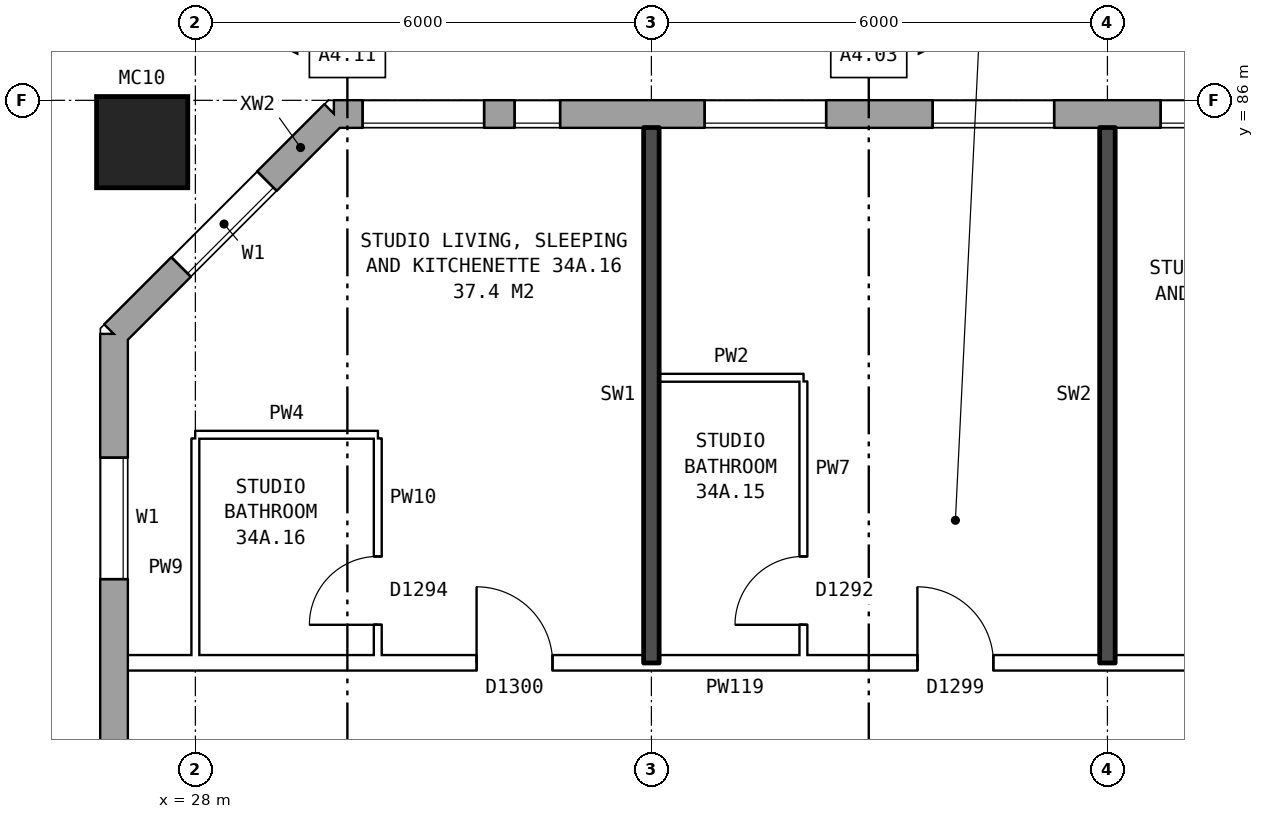
"""IFC4 building model, lengths in metres.
Left out: names, types, materials, properties, quantities, classifications, styles, units other than length and angle.
Written with IfcOpenShell. Run it as: python <this file> out.ifc"""

import sys

from ifc_helpers import new_model, si_unit, direction, frame, frame_2d, origin, origin_2d, place, context, subcontext, project, spatial, rectangle, hollow_rectangle, extrude, element, fill, save


model = new_model("IFC4")
c1 = context("Model", 3, precision=1e-05, world=origin(), true_north=direction((0.0, 1.0)))
c2 = subcontext(c1, "Body", "Model", "MODEL_VIEW")
j1 = project(units=[si_unit("LENGTHUNIT", "METRE"), si_unit("PLANEANGLEUNIT", "RADIAN")], contexts=[c1])
p1 = place(None, origin())
s1 = spatial("IfcSite", under=j1, at=p1, CompositionType="ELEMENT")
p2 = place(p1, origin())
s2 = spatial("IfcBuilding", under=s1, at=p2, CompositionType="ELEMENT")
p3 = place(p2, frame((0.0, 0.0, 123.7)))
s3 = spatial("IfcBuildingStorey", under=s2, at=p3, CompositionType="ELEMENT", Elevation=123.7)
p4 = place(p3, frame((27.3, 85.45, 0.0), z_axis=(0.0, 0.0, 1.0), x_axis=(1.0, 0.0, 0.0)))
e1 = element("IfcColumn", 1, at=p4, inside=s3, PredefinedType="COLUMN", context=c2, shape_type="SweptSolid", body=[
    extrude(hollow_rectangle(XDim=1.2, YDim=1.2, WallThickness=0.065, at=origin_2d()), origin(), (0.0, 0.0, 1.0), 3.1),
])
p5 = place(p3, frame((72.925, 85.82, 0.0), z_axis=(0.0, 0.0, 1.0), x_axis=(-1.0, 0.0, 0.0)))
e2 = element("IfcWall", 2, at=p5, inside=s3, PredefinedType="STANDARD", context=c2, shape_type="SweptSolid", body=[
    extrude(rectangle(XDim=43.101, YDim=0.36, at=frame_2d((21.55, 0.0))), origin(), (0.0, 0.0, 1.0), 2.85),
])
p6 = place(p5, frame((0.625, 0.0, 0.8)))
e3 = element("IfcOpeningElement", 3, at=p6, cuts=e2, PredefinedType="OPENING", context=c2, shape_type="SweptSolid", body=[
    extrude(rectangle(XDim=1.6, YDim=1.8, at=frame_2d((0.8, 0.9))), frame((0.0, 0.19, 0.0), z_axis=(0.0, -1.0, 0.0), x_axis=(1.0, 0.0, 0.0)), (0.0, 0.0, 1.0), 0.38),
])
p7 = place(p5, frame((4.125, 0.0, 0.8)))
e4 = element("IfcOpeningElement", 4, at=p7, cuts=e2, PredefinedType="OPENING", context=c2, shape_type="SweptSolid", body=[
    extrude(rectangle(XDim=0.6, YDim=0.9, at=frame_2d((0.3, 0.45))), frame((0.0, 0.19, 0.0), z_axis=(0.0, -1.0, 0.0), x_axis=(1.0, 0.0, 0.0)), (0.0, 0.0, 1.0), 0.38),
])
p8 = place(p5, frame((6.625, 0.0, 0.8)))
e5 = element("IfcOpeningElement", 5, at=p8, cuts=e2, PredefinedType="OPENING", context=c2, shape_type="SweptSolid", body=[
    extrude(rectangle(XDim=1.6, YDim=1.8, at=frame_2d((0.8, 0.9))), frame((0.0, 0.19, 0.0), z_axis=(0.0, -1.0, 0.0), x_axis=(1.0, 0.0, 0.0)), (0.0, 0.0, 1.0), 0.38),
])
p9 = place(p5, frame((9.625, 0.0, 0.8)))
e6 = element("IfcOpeningElement", 6, at=p9, cuts=e2, PredefinedType="OPENING", context=c2, shape_type="SweptSolid", body=[
    extrude(rectangle(XDim=1.6, YDim=1.8, at=frame_2d((0.8, 0.9))), frame((0.0, 0.19, 0.0), z_axis=(0.0, -1.0, 0.0), x_axis=(1.0, 0.0, 0.0)), (0.0, 0.0, 1.0), 0.38),
])
p10 = place(p5, frame((12.625, 0.0, 0.8)))
e7 = element("IfcOpeningElement", 7, at=p10, cuts=e2, PredefinedType="OPENING", context=c2, shape_type="SweptSolid", body=[
    extrude(rectangle(XDim=1.6, YDim=1.8, at=frame_2d((0.8, 0.9))), frame((0.0, 0.19, 0.0), z_axis=(0.0, -1.0, 0.0), x_axis=(1.0, 0.0, 0.0)), (0.0, 0.0, 1.0), 0.38),
])
p11 = place(p5, frame((15.625, 0.0, 0.8)))
e8 = element("IfcOpeningElement", 8, at=p11, cuts=e2, PredefinedType="OPENING", context=c2, shape_type="SweptSolid", body=[
    extrude(rectangle(XDim=1.6, YDim=1.8, at=frame_2d((0.8, 0.9))), frame((0.0, 0.19, 0.0), z_axis=(0.0, -1.0, 0.0), x_axis=(1.0, 0.0, 0.0)), (0.0, 0.0, 1.0), 0.38),
])
p12 = place(p5, frame((18.625, 0.0, 0.8)))
e9 = element("IfcOpeningElement", 9, at=p12, cuts=e2, PredefinedType="OPENING", context=c2, shape_type="SweptSolid", body=[
    extrude(rectangle(XDim=1.6, YDim=1.8, at=frame_2d((0.8, 0.9))), frame((0.0, 0.19, 0.0), z_axis=(0.0, -1.0, 0.0), x_axis=(1.0, 0.0, 0.0)), (0.0, 0.0, 1.0), 0.38),
])
p13 = place(p5, frame((21.625, 0.0, 0.8)))
e10 = element("IfcOpeningElement", 10, at=p13, cuts=e2, PredefinedType="OPENING", context=c2, shape_type="SweptSolid", body=[
    extrude(rectangle(XDim=1.6, YDim=1.8, at=frame_2d((0.8, 0.9))), frame((0.0, 0.19, 0.0), z_axis=(0.0, -1.0, 0.0), x_axis=(1.0, 0.0, 0.0)), (0.0, 0.0, 1.0), 0.38),
])
p14 = place(p5, frame((24.625, 0.0, 0.8)))
e11 = element("IfcOpeningElement", 11, at=p14, cuts=e2, PredefinedType="OPENING", context=c2, shape_type="SweptSolid", body=[
    extrude(rectangle(XDim=1.6, YDim=1.8, at=frame_2d((0.8, 0.9))), frame((0.0, 0.19, 0.0), z_axis=(0.0, -1.0, 0.0), x_axis=(1.0, 0.0, 0.0)), (0.0, 0.0, 1.0), 0.38),
])
p15 = place(p5, frame((27.625, 0.0, 0.8)))
e12 = element("IfcOpeningElement", 12, at=p15, cuts=e2, PredefinedType="OPENING", context=c2, shape_type="SweptSolid", body=[
    extrude(rectangle(XDim=1.6, YDim=1.8, at=frame_2d((0.8, 0.9))), frame((0.0, 0.19, 0.0), z_axis=(0.0, -1.0, 0.0), x_axis=(1.0, 0.0, 0.0)), (0.0, 0.0, 1.0), 0.38),
])
p16 = place(p5, frame((30.625, 0.0, 0.8)))
e13 = element("IfcOpeningElement", 13, at=p16, cuts=e2, PredefinedType="OPENING", context=c2, shape_type="SweptSolid", body=[
    extrude(rectangle(XDim=1.6, YDim=1.8, at=frame_2d((0.8, 0.9))), frame((0.0, 0.19, 0.0), z_axis=(0.0, -1.0, 0.0), x_axis=(1.0, 0.0, 0.0)), (0.0, 0.0, 1.0), 0.38),
])
p17 = place(p5, frame((33.625, 0.0, 0.8)))
e14 = element("IfcOpeningElement", 14, at=p17, cuts=e2, PredefinedType="OPENING", context=c2, shape_type="SweptSolid", body=[
    extrude(rectangle(XDim=1.6, YDim=1.8, at=frame_2d((0.8, 0.9))), frame((0.0, 0.19, 0.0), z_axis=(0.0, -1.0, 0.0), x_axis=(1.0, 0.0, 0.0)), (0.0, 0.0, 1.0), 0.38),
])
p18 = place(p5, frame((36.625, 0.0, 0.8)))
e15 = element("IfcOpeningElement", 15, at=p18, cuts=e2, PredefinedType="OPENING", context=c2, shape_type="SweptSolid", body=[
    extrude(rectangle(XDim=1.6, YDim=1.8, at=frame_2d((0.8, 0.9))), frame((0.0, 0.19, 0.0), z_axis=(0.0, -1.0, 0.0), x_axis=(1.0, 0.0, 0.0)), (0.0, 0.0, 1.0), 0.38),
])
p19 = place(p5, frame((40.125, 0.0, 1.7)))
e16 = element("IfcOpeningElement", 16, at=p19, cuts=e2, PredefinedType="OPENING", context=c2, shape_type="SweptSolid", body=[
    extrude(rectangle(XDim=0.6, YDim=0.9, at=frame_2d((0.3, 0.45))), frame((0.0, 0.19, 0.0), z_axis=(0.0, -1.0, 0.0), x_axis=(1.0, 0.0, 0.0)), (0.0, 0.0, 1.0), 0.38),
])
p20 = place(p5, frame((5.125, 0.0, 0.8)))
e17 = element("IfcOpeningElement", 17, at=p20, cuts=e2, PredefinedType="OPENING", context=c2, shape_type="SweptSolid", body=[
    extrude(rectangle(XDim=1.2, YDim=1.8, at=frame_2d((0.6, 0.9))), frame((0.0, 0.19, 0.0), z_axis=(0.0, -1.0, 0.0), x_axis=(1.0, 0.0, 0.0)), (0.0, 0.0, 1.0), 0.38),
])
p21 = place(p5, frame((41.125, 0.0, 0.8)))
e18 = element("IfcOpeningElement", 18, at=p21, cuts=e2, PredefinedType="OPENING", context=c2, shape_type="SweptSolid", body=[
    extrude(rectangle(XDim=1.6, YDim=1.8, at=frame_2d((0.8, 0.9))), frame((0.0, 0.19, 0.0), z_axis=(0.0, -1.0, 0.0), x_axis=(1.0, 0.0, 0.0)), (0.0, 0.0, 1.0), 0.38),
])
p22 = place(p3, frame((29.825, 85.82, 0.0), z_axis=(0.0, 0.0, 1.0), x_axis=(-0.707106781187, -0.707106781187, 0.0)))
e19 = element("IfcWall", 19, at=p22, inside=s3, PredefinedType="STANDARD", context=c2, shape_type="SweptSolid", body=[
    extrude(rectangle(XDim=4.094, YDim=0.36, at=frame_2d((2.047, 0.0))), origin(), (0.0, 0.0, 1.0), 2.85),
])
p23 = place(p22, frame((1.247, 0.0, 0.8)))
e20 = element("IfcOpeningElement", 20, at=p23, cuts=e19, PredefinedType="OPENING", context=c2, shape_type="SweptSolid", body=[
    extrude(rectangle(XDim=1.6, YDim=1.8, at=frame_2d((0.8, 0.9))), frame((0.0, 0.19, 0.0), z_axis=(0.0, -1.0, 0.0), x_axis=(1.0, 0.0, 0.0)), (0.0, 0.0, 1.0), 0.38),
])
p24 = place(p3, frame((26.93, 82.925, 0.0), z_axis=(0.0, 0.0, 1.0), x_axis=(0.0, -1.0, 0.0)))
e21 = element("IfcWall", 21, at=p24, inside=s3, PredefinedType="STANDARD", context=c2, shape_type="SweptSolid", body=[
    extrude(rectangle(XDim=25.851, YDim=0.36, at=frame_2d((12.925, 0.0))), origin(), (0.0, 0.0, 1.0), 2.85),
])
p25 = place(p24, frame((1.625, 0.0, 0.8)))
e22 = element("IfcOpeningElement", 22, at=p25, cuts=e21, PredefinedType="OPENING", context=c2, shape_type="SweptSolid", body=[
    extrude(rectangle(XDim=1.6, YDim=1.8, at=frame_2d((0.8, 0.9))), frame((0.0, 0.19, 0.0), z_axis=(0.0, -1.0, 0.0), x_axis=(1.0, 0.0, 0.0)), (0.0, 0.0, 1.0), 0.38),
])
p26 = place(p24, frame((5.775, 0.0, 0.8)))
e23 = element("IfcOpeningElement", 23, at=p26, cuts=e21, PredefinedType="OPENING", context=c2, shape_type="SweptSolid", body=[
    extrude(rectangle(XDim=0.6, YDim=0.9, at=frame_2d((0.3, 0.45))), frame((0.0, 0.19, 0.0), z_axis=(0.0, -1.0, 0.0), x_axis=(1.0, 0.0, 0.0)), (0.0, 0.0, 1.0), 0.38),
])
p27 = place(p24, frame((7.625, 0.0, 0.8)))
e24 = element("IfcOpeningElement", 24, at=p27, cuts=e21, PredefinedType="OPENING", context=c2, shape_type="SweptSolid", body=[
    extrude(rectangle(XDim=1.6, YDim=1.8, at=frame_2d((0.8, 0.9))), frame((0.0, 0.19, 0.0), z_axis=(0.0, -1.0, 0.0), x_axis=(1.0, 0.0, 0.0)), (0.0, 0.0, 1.0), 0.38),
])
p28 = place(p24, frame((10.625, 0.0, 0.8)))
e25 = element("IfcOpeningElement", 25, at=p28, cuts=e21, PredefinedType="OPENING", context=c2, shape_type="SweptSolid", body=[
    extrude(rectangle(XDim=1.6, YDim=1.8, at=frame_2d((0.8, 0.9))), frame((0.0, 0.19, 0.0), z_axis=(0.0, -1.0, 0.0), x_axis=(1.0, 0.0, 0.0)), (0.0, 0.0, 1.0), 0.38),
])
p29 = place(p24, frame((13.625, 0.0, 0.8)))
e26 = element("IfcOpeningElement", 26, at=p29, cuts=e21, PredefinedType="OPENING", context=c2, shape_type="SweptSolid", body=[
    extrude(rectangle(XDim=1.6, YDim=1.8, at=frame_2d((0.8, 0.9))), frame((0.0, 0.19, 0.0), z_axis=(0.0, -1.0, 0.0), x_axis=(1.0, 0.0, 0.0)), (0.0, 0.0, 1.0), 0.38),
])
p30 = place(p24, frame((16.625, 0.0, 0.8)))
e27 = element("IfcOpeningElement", 27, at=p30, cuts=e21, PredefinedType="OPENING", context=c2, shape_type="SweptSolid", body=[
    extrude(rectangle(XDim=1.6, YDim=1.8, at=frame_2d((0.8, 0.9))), frame((0.0, 0.19, 0.0), z_axis=(0.0, -1.0, 0.0), x_axis=(1.0, 0.0, 0.0)), (0.0, 0.0, 1.0), 0.38),
])
p31 = place(p24, frame((6.675, 0.0, 0.8)))
e28 = element("IfcOpeningElement", 28, at=p31, cuts=e21, PredefinedType="OPENING", context=c2, shape_type="SweptSolid", body=[
    extrude(rectangle(XDim=0.6, YDim=1.5, at=frame_2d((0.3, 0.75))), frame((0.0, 0.19, 0.0), z_axis=(0.0, -1.0, 0.0), x_axis=(1.0, 0.0, 0.0)), (0.0, 0.0, 1.0), 0.38),
])
p32 = place(p24, frame((22.625, 0.0, 0.8)))
e29 = element("IfcOpeningElement", 29, at=p32, cuts=e21, PredefinedType="OPENING", context=c2, shape_type="SweptSolid", body=[
    extrude(rectangle(XDim=1.6, YDim=1.8, at=frame_2d((0.8, 0.9))), frame((0.0, 0.19, 0.0), z_axis=(0.0, -1.0, 0.0), x_axis=(1.0, 0.0, 0.0)), (0.0, 0.0, 1.0), 0.38),
])
p33 = place(p24, frame((9.525, 0.0, 0.8)))
e30 = element("IfcOpeningElement", 30, at=p33, cuts=e21, PredefinedType="OPENING", context=c2, shape_type="SweptSolid", body=[
    extrude(rectangle(XDim=0.8, YDim=1.8, at=frame_2d((0.4, 0.9))), frame((0.0, 0.19, 0.0), z_axis=(0.0, -1.0, 0.0), x_axis=(1.0, 0.0, 0.0)), (0.0, 0.0, 1.0), 0.38),
])
p34 = place(p24, frame((12.525, 0.0, 0.8)))
e31 = element("IfcOpeningElement", 31, at=p34, cuts=e21, PredefinedType="OPENING", context=c2, shape_type="SweptSolid", body=[
    extrude(rectangle(XDim=0.8, YDim=1.8, at=frame_2d((0.4, 0.9))), frame((0.0, 0.19, 0.0), z_axis=(0.0, -1.0, 0.0), x_axis=(1.0, 0.0, 0.0)), (0.0, 0.0, 1.0), 0.38),
])
p35 = place(p24, frame((15.525, 0.0, 0.8)))
e32 = element("IfcOpeningElement", 32, at=p35, cuts=e21, PredefinedType="OPENING", context=c2, shape_type="SweptSolid", body=[
    extrude(rectangle(XDim=0.8, YDim=1.8, at=frame_2d((0.4, 0.9))), frame((0.0, 0.19, 0.0), z_axis=(0.0, -1.0, 0.0), x_axis=(1.0, 0.0, 0.0)), (0.0, 0.0, 1.0), 0.38),
])
p36 = place(p24, frame((18.525, 0.0, 0.8)))
e33 = element("IfcOpeningElement", 33, at=p36, cuts=e21, PredefinedType="OPENING", context=c2, shape_type="SweptSolid", body=[
    extrude(rectangle(XDim=0.6, YDim=1.5, at=frame_2d((0.3, 0.75))), frame((0.0, 0.19, 0.0), z_axis=(0.0, -1.0, 0.0), x_axis=(1.0, 0.0, 0.0)), (0.0, 0.0, 1.0), 0.38),
])
p37 = place(p24, frame((19.425, 0.0, 0.8)))
e34 = element("IfcOpeningElement", 34, at=p37, cuts=e21, PredefinedType="OPENING", context=c2, shape_type="SweptSolid", body=[
    extrude(rectangle(XDim=0.6, YDim=0.9, at=frame_2d((0.3, 0.45))), frame((0.0, 0.19, 0.0), z_axis=(0.0, -1.0, 0.0), x_axis=(1.0, 0.0, 0.0)), (0.0, 0.0, 1.0), 0.38),
])
p38 = place(p3, frame((27.11, 78.6, 0.0), z_axis=(0.0, 0.0, 1.0), x_axis=(1.0, 0.0, 0.0)))
e35 = element("IfcWall", 35, at=p38, inside=s3, PredefinedType="PARTITIONING", context=c2, shape_type="SweptSolid", body=[
    extrude(rectangle(XDim=18.79, YDim=0.2, at=frame_2d((9.395, 0.0))), origin(), (0.0, 0.0, 1.0), 2.85),
])
p39 = place(p38, frame((14.19, 0.0, 0.0)))
e36 = element("IfcOpeningElement", 36, at=p39, cuts=e35, PredefinedType="OPENING", context=c2, shape_type="SweptSolid", body=[
    extrude(rectangle(XDim=1.0, YDim=2.1, at=frame_2d((0.5, 1.05))), frame((0.0, 0.11, 0.0), z_axis=(0.0, -1.0, 0.0), x_axis=(1.0, 0.0, 0.0)), (0.0, 0.0, 1.0), 0.22),
])
p40 = place(p38, frame((10.39, 0.0, 0.0)))
e37 = element("IfcOpeningElement", 37, at=p40, cuts=e35, PredefinedType="OPENING", context=c2, shape_type="SweptSolid", body=[
    extrude(rectangle(XDim=1.0, YDim=2.1, at=frame_2d((0.5, 1.05))), frame((0.0, 0.11, 0.0), z_axis=(0.0, -1.0, 0.0), x_axis=(1.0, 0.0, 0.0)), (0.0, 0.0, 1.0), 0.22),
])
p41 = place(p38, frame((4.59, 0.0, 0.0)))
e38 = element("IfcOpeningElement", 38, at=p41, cuts=e35, PredefinedType="OPENING", context=c2, shape_type="SweptSolid", body=[
    extrude(rectangle(XDim=1.0, YDim=2.1, at=frame_2d((0.5, 1.05))), frame((0.0, 0.11, 0.0), z_axis=(0.0, -1.0, 0.0), x_axis=(1.0, 0.0, 0.0)), (0.0, 0.0, 1.0), 0.22),
])
p42 = place(p3, frame((28.0, 81.6, 0.0), z_axis=(0.0, 0.0, 1.0), x_axis=(1.0, 0.0, 0.0)))
e39 = element("IfcWall", 39, at=p42, inside=s3, PredefinedType="PARTITIONING", context=c2, shape_type="SweptSolid", body=[
    extrude(rectangle(XDim=2.4, YDim=0.1, at=frame_2d((1.2, 0.0))), origin(), (0.0, 0.0, 1.0), 2.85),
])
p43 = place(p3, frame((34.1, 82.35, 0.0), z_axis=(0.0, 0.0, 1.0), x_axis=(1.0, 0.0, 0.0)))
e40 = element("IfcWall", 40, at=p43, inside=s3, PredefinedType="PARTITIONING", context=c2, shape_type="SweptSolid", body=[
    extrude(rectangle(XDim=1.9, YDim=0.1, at=frame_2d((0.95, 0.0))), origin(), (0.0, 0.0, 1.0), 2.85),
])
p44 = place(p3, frame((28.0, 78.7, 0.0), z_axis=(0.0, 0.0, 1.0), x_axis=(0.0, 1.0, 0.0)))
e41 = element("IfcWall", 41, at=p44, inside=s3, PredefinedType="PARTITIONING", context=c2, shape_type="SweptSolid", body=[
    extrude(rectangle(XDim=2.85, YDim=0.1, at=frame_2d((1.425, 0.0))), origin(), (0.0, 0.0, 1.0), 2.85),
])
p45 = place(p3, frame((30.4, 78.7, 0.0), z_axis=(0.0, 0.0, 1.0), x_axis=(0.0, 1.0, 0.0)))
e42 = element("IfcWall", 42, at=p45, inside=s3, PredefinedType="PARTITIONING", context=c2, shape_type="SweptSolid", body=[
    extrude(rectangle(XDim=2.85, YDim=0.1, at=frame_2d((1.425, 0.0))), origin(), (0.0, 0.0, 1.0), 2.85),
])
p46 = place(p45, frame((0.4, 0.0, 0.0)))
e43 = element("IfcOpeningElement", 43, at=p46, cuts=e42, PredefinedType="OPENING", context=c2, shape_type="SweptSolid", body=[
    extrude(rectangle(XDim=0.9, YDim=2.1, at=frame_2d((0.45, 1.05))), frame((0.0, 0.06, 0.0), z_axis=(0.0, -1.0, 0.0), x_axis=(1.0, 0.0, 0.0)), (0.0, 0.0, 1.0), 0.12),
])
p47 = place(p3, frame((34.0, 78.6, 0.0), z_axis=(0.0, 0.0, 1.0), x_axis=(0.0, 1.0, 0.0)))
e44 = element("IfcWall", 44, at=p47, inside=s3, PredefinedType="SOLIDWALL", context=c2, shape_type="SweptSolid", body=[
    extrude(rectangle(XDim=7.04, YDim=0.2, at=frame_2d((3.52, 0.0))), origin(), (0.0, 0.0, 1.0), 2.85),
])
p48 = place(p3, frame((36.0, 78.7, 0.0), z_axis=(0.0, 0.0, 1.0), x_axis=(0.0, 1.0, 0.0)))
e45 = element("IfcWall", 45, at=p48, inside=s3, PredefinedType="PARTITIONING", context=c2, shape_type="SweptSolid", body=[
    extrude(rectangle(XDim=3.6, YDim=0.1, at=frame_2d((1.8, 0.0))), origin(), (0.0, 0.0, 1.0), 2.85),
])
p49 = place(p48, frame((0.4, 0.0, 0.0)))
e46 = element("IfcOpeningElement", 46, at=p49, cuts=e45, PredefinedType="OPENING", context=c2, shape_type="SweptSolid", body=[
    extrude(rectangle(XDim=0.9, YDim=2.1, at=frame_2d((0.45, 1.05))), frame((0.0, 0.06, 0.0), z_axis=(0.0, -1.0, 0.0), x_axis=(1.0, 0.0, 0.0)), (0.0, 0.0, 1.0), 0.12),
])
p50 = place(p3, frame((40.0, 78.6, 0.0), z_axis=(0.0, 0.0, 1.0), x_axis=(0.0, 1.0, 0.0)))
e47 = element("IfcWall", 47, at=p50, inside=s3, PredefinedType="SOLIDWALL", context=c2, shape_type="SweptSolid", body=[
    extrude(rectangle(XDim=7.04, YDim=0.2, at=frame_2d((3.52, 0.0))), origin(), (0.0, 0.0, 1.0), 2.85),
])
p51 = place(p16, origin())
e48 = element("IfcWindow", 48, at=p51, inside=s3, PartitioningType="SINGLE_PANEL", PredefinedType="WINDOW", context=c2, shape_type="SweptSolid", body=[
    extrude(rectangle(XDim=1.6, YDim=1.8, at=frame_2d((0.8, 0.9))), frame((0.0, 0.15, 0.0), z_axis=(0.0, -1.0, 0.0), x_axis=(1.0, 0.0, 0.0)), (0.0, 0.0, 1.0), 0.06),
])
fill(e13, e48)
p52 = place(p17, origin())
e49 = element("IfcWindow", 49, at=p52, inside=s3, PartitioningType="SINGLE_PANEL", PredefinedType="WINDOW", context=c2, shape_type="SweptSolid", body=[
    extrude(rectangle(XDim=1.6, YDim=1.8, at=frame_2d((0.8, 0.9))), frame((0.0, 0.15, 0.0), z_axis=(0.0, -1.0, 0.0), x_axis=(1.0, 0.0, 0.0)), (0.0, 0.0, 1.0), 0.06),
])
fill(e14, e49)
p53 = place(p18, origin())
e50 = element("IfcWindow", 50, at=p53, inside=s3, PartitioningType="SINGLE_PANEL", PredefinedType="WINDOW", context=c2, shape_type="SweptSolid", body=[
    extrude(rectangle(XDim=1.6, YDim=1.8, at=frame_2d((0.8, 0.9))), frame((0.0, 0.15, 0.0), z_axis=(0.0, -1.0, 0.0), x_axis=(1.0, 0.0, 0.0)), (0.0, 0.0, 1.0), 0.06),
])
fill(e15, e50)
p54 = place(p19, origin())
e51 = element("IfcWindow", 51, at=p54, inside=s3, PartitioningType="SINGLE_PANEL", PredefinedType="WINDOW", context=c2, shape_type="SweptSolid", body=[
    extrude(rectangle(XDim=0.6, YDim=0.9, at=frame_2d((0.3, 0.45))), frame((0.0, 0.15, 0.0), z_axis=(0.0, -1.0, 0.0), x_axis=(1.0, 0.0, 0.0)), (0.0, 0.0, 1.0), 0.06),
])
fill(e16, e51)
p55 = place(p23, origin())
e52 = element("IfcWindow", 52, at=p55, inside=s3, PartitioningType="SINGLE_PANEL", PredefinedType="WINDOW", context=c2, shape_type="SweptSolid", body=[
    extrude(rectangle(XDim=1.6, YDim=1.8, at=frame_2d((0.8, 0.9))), frame((0.0, 0.15, 0.0), z_axis=(0.0, -1.0, 0.0), x_axis=(1.0, 0.0, 0.0)), (0.0, 0.0, 1.0), 0.06),
])
fill(e20, e52)
p56 = place(p25, origin())
e53 = element("IfcWindow", 53, at=p56, inside=s3, PartitioningType="SINGLE_PANEL", PredefinedType="WINDOW", context=c2, shape_type="SweptSolid", body=[
    extrude(rectangle(XDim=1.6, YDim=1.8, at=frame_2d((0.8, 0.9))), frame((0.0, 0.15, 0.0), z_axis=(0.0, -1.0, 0.0), x_axis=(1.0, 0.0, 0.0)), (0.0, 0.0, 1.0), 0.06),
])
fill(e22, e53)
p57 = place(p40, origin())
e54 = element("IfcDoor", 54, at=p57, inside=s3, OperationType="SINGLE_SWING_LEFT", PredefinedType="DOOR", context=c2, shape_type="SweptSolid", body=[
    extrude(rectangle(XDim=1.0, YDim=2.1, at=frame_2d((0.5, 1.05))), frame((0.0, 0.025, 0.0), z_axis=(0.0, -1.0, 0.0), x_axis=(1.0, 0.0, 0.0)), (0.0, 0.0, 1.0), 0.05),
])
fill(e37, e54)
p58 = place(p49, origin())
e55 = element("IfcDoor", 55, at=p58, inside=s3, OperationType="SINGLE_SWING_LEFT", PredefinedType="DOOR", context=c2, shape_type="SweptSolid", body=[
    extrude(rectangle(XDim=0.9, YDim=2.1, at=frame_2d((0.45, 1.05))), frame((0.0, 0.025, 0.0), z_axis=(0.0, -1.0, 0.0), x_axis=(1.0, 0.0, 0.0)), (0.0, 0.0, 1.0), 0.05),
])
fill(e46, e55)
p59 = place(p41, origin())
e56 = element("IfcDoor", 56, at=p59, inside=s3, OperationType="SINGLE_SWING_LEFT", PredefinedType="DOOR", context=c2, shape_type="SweptSolid", body=[
    extrude(rectangle(XDim=1.0, YDim=2.1, at=frame_2d((0.5, 1.05))), frame((0.0, 0.025, 0.0), z_axis=(0.0, -1.0, 0.0), x_axis=(1.0, 0.0, 0.0)), (0.0, 0.0, 1.0), 0.05),
])
fill(e38, e56)
p60 = place(p46, origin())
e57 = element("IfcDoor", 57, at=p60, inside=s3, OperationType="SINGLE_SWING_LEFT", PredefinedType="DOOR", context=c2, shape_type="SweptSolid", body=[
    extrude(rectangle(XDim=0.9, YDim=2.1, at=frame_2d((0.45, 1.05))), frame((0.0, 0.025, 0.0), z_axis=(0.0, -1.0, 0.0), x_axis=(1.0, 0.0, 0.0)), (0.0, 0.0, 1.0), 0.05),
])
fill(e43, e57)
p61 = place(p21, origin())
e58 = element("IfcWindow", 58, at=p61, inside=s3, PartitioningType="SINGLE_PANEL", PredefinedType="WINDOW", context=c2, shape_type="SweptSolid", body=[
    extrude(rectangle(XDim=1.6, YDim=1.8, at=frame_2d((0.8, 0.9))), frame((0.0, 0.15, 0.0), z_axis=(0.0, -1.0, 0.0), x_axis=(1.0, 0.0, 0.0)), (0.0, 0.0, 1.0), 0.06),
])
fill(e18, e58)
save(model, sys.argv[1])
